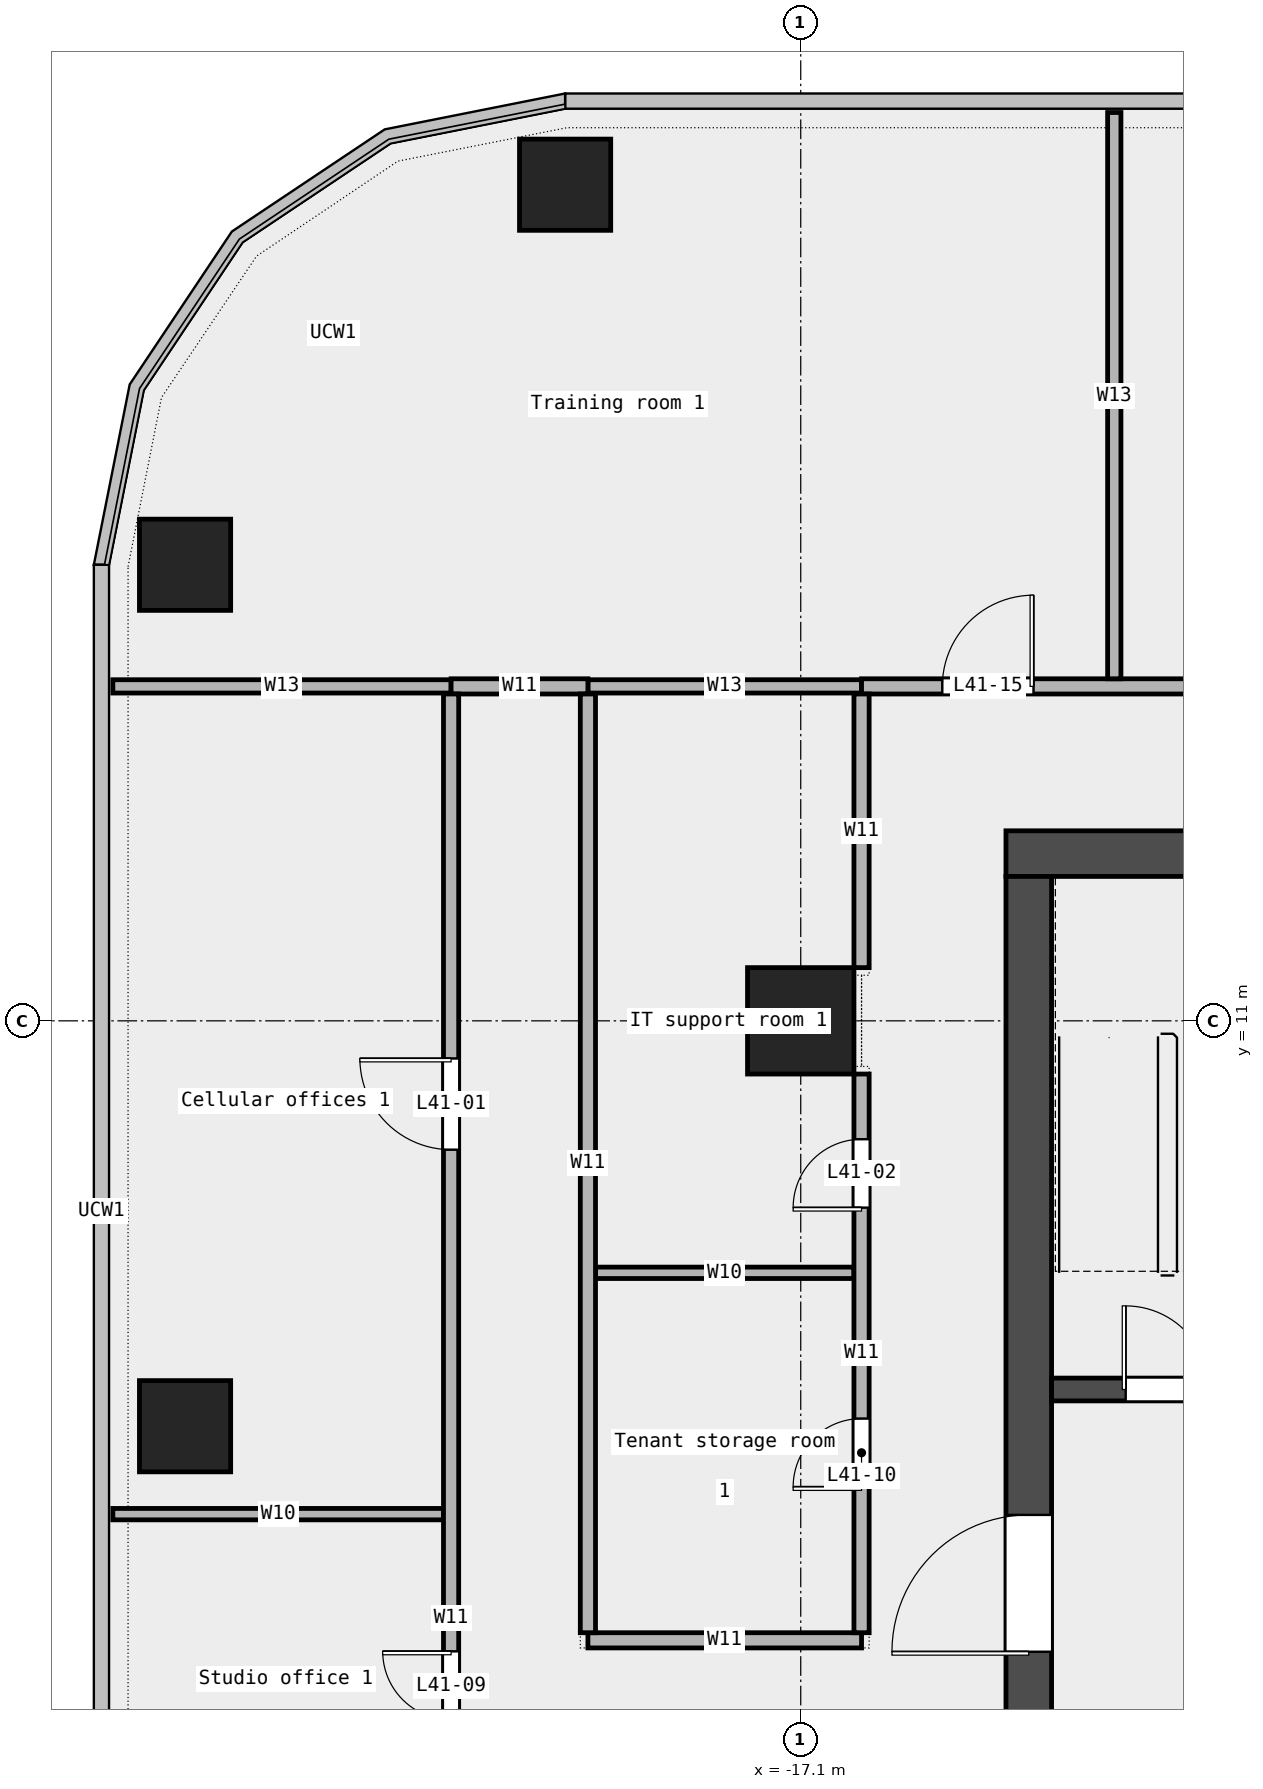
"""IFC4 building model, lengths in metres.
Left out: names, types, materials, properties, quantities, classifications, styles, units other than length and angle.
Written with IfcOpenShell. Run it as: python <this file> out.ifc"""

import sys

from ifc_helpers import new_model, si_unit, direction, frame, frame_2d, origin, origin_2d, place, context, subcontext, project, spatial, rectangle, extrude, element, fill, save


model = new_model("IFC4")
c1 = context("Model", 3, precision=1e-05, world=origin(), true_north=direction((0.0, 1.0)))
c2 = subcontext(c1, "Body", "Model", "MODEL_VIEW")
j1 = project(units=[si_unit("LENGTHUNIT", "METRE"), si_unit("PLANEANGLEUNIT", "RADIAN")], contexts=[c1])
p1 = place(None, origin())
s1 = spatial("IfcSite", under=j1, at=p1, CompositionType="ELEMENT")
p2 = place(p1, origin())
s2 = spatial("IfcBuilding", under=s1, at=p2, CompositionType="ELEMENT")
p3 = place(p2, frame((0.0, 0.0, 197.0)))
s3 = spatial("IfcBuildingStorey", under=s2, at=p3, CompositionType="ELEMENT", Elevation=197.0)
for number, where, z_axis, x_axis in (
    (1, (-20.2, 22.0, 0.0), (0.0, 0.0, 1.0), (1.0, 0.0, 0.0)),
    (2, (-25.2, 17.0, 0.0), (0.0, 0.0, 1.0), (1.0, 0.0, 0.0)),
    (3, (-25.2, 5.667, 0.0), (0.0, 0.0, 1.0), (1.0, 0.0, 0.0)),
):
    element("IfcColumn", number, at=place(p3, frame(where, z_axis=z_axis, x_axis=x_axis)), inside=s3, PredefinedType="COLUMN", context=c2, shape_type="SweptSolid", body=[
        extrude(rectangle(XDim=1.2, YDim=1.2, at=origin_2d()), origin(), (0.0, 0.0, 1.0), 3.6),
    ])
p4 = place(p3, frame((-17.1, 11.0, 0.0), z_axis=(0.0, 0.0, 1.0), x_axis=(1.0, 0.0, 0.0)))
e4 = element("IfcColumn", 4, at=p4, inside=s3, PredefinedType="COLUMN", context=c2, shape_type="SweptSolid", body=[
    extrude(rectangle(XDim=1.4, YDim=1.4, at=origin_2d()), origin(), (0.0, 0.0, 1.0), 3.6),
])
p5 = place(p3, frame((-19.9, 2.85, 0.0), z_axis=(0.0, 0.0, 1.0), x_axis=(1.0, 0.0, 0.0)))
e5 = element("IfcWall", 5, at=p5, inside=s3, PredefinedType="PARTITIONING", context=c2, shape_type="SweptSolid", body=[
    extrude(rectangle(XDim=3.6, YDim=0.2, at=frame_2d((1.8, 0.0))), origin(), (0.0, 0.0, 1.0), 3.6),
])
p6 = place(p3, frame((-26.15, 4.51, 0.0), z_axis=(0.0, 0.0, 1.0), x_axis=(1.0, 0.0, 0.0)))
e6 = element("IfcWall", 6, at=p6, inside=s3, PredefinedType="PARTITIONING", context=c2, shape_type="SweptSolid", body=[
    extrude(rectangle(XDim=4.35, YDim=0.15, at=frame_2d((2.175, 0.0))), origin(), (0.0, 0.0, 1.0), 3.6),
])
p7 = place(p3, frame((-19.8, 7.685, 0.0), z_axis=(0.0, 0.0, 1.0), x_axis=(1.0, 0.0, 0.0)))
e7 = element("IfcWall", 7, at=p7, inside=s3, PredefinedType="PARTITIONING", context=c2, shape_type="SweptSolid", body=[
    extrude(rectangle(XDim=3.4, YDim=0.15, at=frame_2d((1.7, 0.0))), origin(), (0.0, 0.0, 1.0), 3.6),
])
p8 = place(p3, frame((-26.15, 15.4, 0.0), z_axis=(0.0, 0.0, 1.0), x_axis=(1.0, 0.0, 0.0)))
e8 = element("IfcWall", 8, at=p8, inside=s3, PredefinedType="PARTITIONING", context=c2, shape_type="SweptSolid", body=[
    extrude(rectangle(XDim=4.45, YDim=0.175, at=frame_2d((2.225, 0.0))), origin(), (0.0, 0.0, 1.0), 3.6),
])
p9 = place(p3, frame((-19.9, 15.4, 0.0), z_axis=(0.0, 0.0, 1.0), x_axis=(1.0, 0.0, 0.0)))
e9 = element("IfcWall", 9, at=p9, inside=s3, PredefinedType="PARTITIONING", context=c2, shape_type="SweptSolid", body=[
    extrude(rectangle(XDim=3.6, YDim=0.175, at=frame_2d((1.8, 0.0))), origin(), (0.0, 0.0, 1.0), 3.6),
])
p10 = place(p3, frame((-21.7, 15.4, 0.0), z_axis=(0.0, 0.0, 1.0), x_axis=(1.0, 0.0, 0.0)))
e10 = element("IfcWall", 10, at=p10, inside=s3, PredefinedType="PARTITIONING", context=c2, shape_type="SweptSolid", body=[
    extrude(rectangle(XDim=1.8, YDim=0.2, at=frame_2d((0.9, 0.0))), origin(), (0.0, 0.0, 1.0), 3.6),
])
p11 = place(p3, frame((-16.3, 15.4, 0.0), z_axis=(0.0, 0.0, 1.0), x_axis=(1.0, 0.0, 0.0)))
e11 = element("IfcWall", 11, at=p11, inside=s3, PredefinedType="PARTITIONING", context=c2, shape_type="SweptSolid", body=[
    extrude(rectangle(XDim=32.6, YDim=0.2, at=frame_2d((16.3, 0.0))), origin(), (0.0, 0.0, 1.0), 3.6),
])
p12 = place(p11, frame((10.185, 0.0, 0.0)))
e12 = element("IfcOpeningElement", 12, at=p12, cuts=e11, PredefinedType="OPENING", context=c2, shape_type="SweptSolid", body=[
    extrude(rectangle(XDim=1.5, YDim=2.1, at=frame_2d((0.75, 1.05))), frame((0.0, 0.112, 0.0), z_axis=(0.0, -1.0, 0.0), x_axis=(1.0, 0.0, 0.0)), (0.0, 0.0, 1.0), 0.224),
])
p13 = place(p11, frame((1.062, 0.0, 0.0)))
e13 = element("IfcOpeningElement", 13, at=p13, cuts=e11, PredefinedType="OPENING", context=c2, shape_type="SweptSolid", body=[
    extrude(rectangle(XDim=1.2, YDim=2.1, at=frame_2d((0.6, 1.05))), frame((0.0, 0.112, 0.0), z_axis=(0.0, -1.0, 0.0), x_axis=(1.0, 0.0, 0.0)), (0.0, 0.0, 1.0), 0.224),
])
p14 = place(p11, frame((24.677, 0.0, 0.0)))
e14 = element("IfcOpeningElement", 14, at=p14, cuts=e11, PredefinedType="OPENING", context=c2, shape_type="SweptSolid", body=[
    extrude(rectangle(XDim=1.2, YDim=2.1, at=frame_2d((0.6, 1.05))), frame((0.0, 0.112, 0.0), z_axis=(0.0, -1.0, 0.0), x_axis=(1.0, 0.0, 0.0)), (0.0, 0.0, 1.0), 0.224),
])
p15 = place(p3, frame((-21.7, -9.0, 0.0), z_axis=(0.0, 0.0, 1.0), x_axis=(0.0, 1.0, 0.0)))
e15 = element("IfcWall", 15, at=p15, inside=s3, PredefinedType="PARTITIONING", context=c2, shape_type="SweptSolid", body=[
    extrude(rectangle(XDim=24.3, YDim=0.2, at=frame_2d((12.15, 0.0))), origin(), (0.0, 0.0, 1.0), 3.6),
])
p16 = place(p15, frame((18.305, 0.0, 0.0)))
e16 = element("IfcOpeningElement", 16, at=p16, cuts=e15, PredefinedType="OPENING", context=c2, shape_type="SweptSolid", body=[
    extrude(rectangle(XDim=1.2, YDim=2.1, at=frame_2d((0.6, 1.05))), frame((0.0, 0.112, 0.0), z_axis=(0.0, -1.0, 0.0), x_axis=(1.0, 0.0, 0.0)), (0.0, 0.0, 1.0), 0.224),
])
p17 = place(p15, frame((10.805, 0.0, 0.0)))
e17 = element("IfcOpeningElement", 17, at=p17, cuts=e15, PredefinedType="OPENING", context=c2, shape_type="SweptSolid", body=[
    extrude(rectangle(XDim=0.9, YDim=2.1, at=frame_2d((0.45, 1.05))), frame((0.0, 0.112, 0.0), z_axis=(0.0, -1.0, 0.0), x_axis=(1.0, 0.0, 0.0)), (0.0, 0.0, 1.0), 0.224),
])
p18 = place(p3, frame((-19.9, 2.95, 0.0), z_axis=(0.0, 0.0, 1.0), x_axis=(0.0, 1.0, 0.0)))
e18 = element("IfcWall", 18, at=p18, inside=s3, PredefinedType="PARTITIONING", context=c2, shape_type="SweptSolid", body=[
    extrude(rectangle(XDim=12.35, YDim=0.2, at=frame_2d((6.175, 0.0))), origin(), (0.0, 0.0, 1.0), 3.6),
])
p19 = place(p3, frame((-16.3, 2.95, 0.0), z_axis=(0.0, 0.0, 1.0), x_axis=(0.0, 1.0, 0.0)))
e19 = element("IfcWall", 19, at=p19, inside=s3, PredefinedType="PARTITIONING", context=c2, shape_type="SweptSolid", body=[
    extrude(rectangle(XDim=7.35, YDim=0.2, at=frame_2d((3.675, 0.0))), origin(), (0.0, 0.0, 1.0), 3.6),
])
p20 = place(p19, frame((5.593, 0.0, 0.0)))
e20 = element("IfcOpeningElement", 20, at=p20, cuts=e19, PredefinedType="OPENING", context=c2, shape_type="SweptSolid", body=[
    extrude(rectangle(XDim=0.9, YDim=2.1, at=frame_2d((0.45, 1.05))), frame((0.0, 0.112, 0.0), z_axis=(0.0, -1.0, 0.0), x_axis=(1.0, 0.0, 0.0)), (0.0, 0.0, 1.0), 0.224),
])
p21 = place(p19, frame((1.917, 0.0, 0.0)))
e21 = element("IfcOpeningElement", 21, at=p21, cuts=e19, PredefinedType="OPENING", context=c2, shape_type="SweptSolid", body=[
    extrude(rectangle(XDim=0.9, YDim=2.1, at=frame_2d((0.45, 1.05))), frame((0.0, 0.112, 0.0), z_axis=(0.0, -1.0, 0.0), x_axis=(1.0, 0.0, 0.0)), (0.0, 0.0, 1.0), 0.224),
])
p22 = place(p3, frame((-16.3, 11.7, 0.0), z_axis=(0.0, 0.0, 1.0), x_axis=(0.0, 1.0, 0.0)))
e22 = element("IfcWall", 22, at=p22, inside=s3, PredefinedType="PARTITIONING", context=c2, shape_type="SweptSolid", body=[
    extrude(rectangle(XDim=3.6, YDim=0.2, at=frame_2d((1.8, 0.0))), origin(), (0.0, 0.0, 1.0), 3.6),
])
p23 = place(p3, frame((-12.975, 15.5, 0.0), z_axis=(0.0, 0.0, 1.0), x_axis=(0.0, 1.0, 0.0)))
e23 = element("IfcWall", 23, at=p23, inside=s3, PredefinedType="PARTITIONING", context=c2, shape_type="SweptSolid", body=[
    extrude(rectangle(XDim=7.45, YDim=0.175, at=frame_2d((3.725, 0.0))), origin(), (0.0, 0.0, 1.0), 3.6),
])
p24 = place(p3, frame((-14.4, 13.2, 0.0), z_axis=(0.0, 0.0, 1.0), x_axis=(1.0, 0.0, 0.0)))
e24 = element("IfcWall", 24, at=p24, inside=s3, PredefinedType="SHEAR", context=c2, shape_type="SweptSolid", body=[
    extrude(rectangle(XDim=28.8, YDim=0.6, at=frame_2d((14.4, 0.0))), origin(), (0.0, 0.0, 1.0), 3.7),
])
p25 = place(p24, frame((6.775, 0.0, 0.0)))
e25 = element("IfcOpeningElement", 25, at=p25, cuts=e24, PredefinedType="OPENING", context=c2, shape_type="SweptSolid", body=[
    extrude(rectangle(XDim=1.0, YDim=2.1, at=frame_2d((0.5, 1.05))), frame((0.0, 0.312, 0.0), z_axis=(0.0, -1.0, 0.0), x_axis=(1.0, 0.0, 0.0)), (0.0, 0.0, 1.0), 0.624),
])
p26 = place(p24, frame((13.525, 0.0, 0.0)))
e26 = element("IfcOpeningElement", 26, at=p26, cuts=e24, PredefinedType="OPENING", context=c2, shape_type="SweptSolid", body=[
    extrude(rectangle(XDim=1.0, YDim=2.1, at=frame_2d((0.5, 1.05))), frame((0.0, 0.312, 0.0), z_axis=(0.0, -1.0, 0.0), x_axis=(1.0, 0.0, 0.0)), (0.0, 0.0, 1.0), 0.624),
])
p27 = place(p24, frame((20.65, 0.0, 0.0)))
e27 = element("IfcOpeningElement", 27, at=p27, cuts=e24, PredefinedType="OPENING", context=c2, shape_type="SweptSolid", body=[
    extrude(rectangle(XDim=1.0, YDim=2.1, at=frame_2d((0.5, 1.05))), frame((0.0, 0.312, 0.0), z_axis=(0.0, -1.0, 0.0), x_axis=(1.0, 0.0, 0.0)), (0.0, 0.0, 1.0), 0.624),
])
p28 = place(p3, frame((-14.1, -6.6, 0.0), z_axis=(0.0, 0.0, 1.0), x_axis=(0.0, 1.0, 0.0)))
e28 = element("IfcWall", 28, at=p28, inside=s3, PredefinedType="SHEAR", context=c2, shape_type="SweptSolid", body=[
    extrude(rectangle(XDim=19.5, YDim=0.6, at=frame_2d((9.75, 0.0))), origin(), (0.0, 0.0, 1.0), 3.7),
])
p29 = place(p28, frame((9.3, 0.0, 0.0)))
e29 = element("IfcOpeningElement", 29, at=p29, cuts=e28, PredefinedType="OPENING", context=c2, shape_type="SweptSolid", body=[
    extrude(rectangle(XDim=1.8, YDim=2.1, at=frame_2d((0.9, 1.05))), frame((0.0, 0.312, 0.0), z_axis=(0.0, -1.0, 0.0), x_axis=(1.0, 0.0, 0.0)), (0.0, 0.0, 1.0), 0.624),
])
p30 = place(p3, frame((-13.8, 6.15, 0.0), z_axis=(0.0, 0.0, 1.0), x_axis=(1.0, 0.0, 0.0)))
e30 = element("IfcWall", 30, at=p30, inside=s3, PredefinedType="SOLIDWALL", context=c2, shape_type="SweptSolid", body=[
    extrude(rectangle(XDim=3.15, YDim=0.3, at=frame_2d((1.575, 0.0))), origin(), (0.0, 0.0, 1.0), 3.7),
])
p31 = place(p30, frame((0.975, 0.0, 0.0)))
e31 = element("IfcOpeningElement", 31, at=p31, cuts=e30, PredefinedType="OPENING", context=c2, shape_type="SweptSolid", body=[
    extrude(rectangle(XDim=1.1, YDim=2.1, at=frame_2d((0.55, 1.05))), frame((0.0, 0.162, 0.0), z_axis=(0.0, -1.0, 0.0), x_axis=(1.0, 0.0, 0.0)), (0.0, 0.0, 1.0), 0.324),
])
p32 = place(p16, origin())
e32 = element("IfcDoor", 32, at=p32, inside=s3, OperationType="SINGLE_SWING_RIGHT", PredefinedType="DOOR", context=c2, shape_type="SweptSolid", body=[
    extrude(rectangle(XDim=1.2, YDim=2.1, at=frame_2d((0.6, 1.05))), frame((0.0, 0.025, 0.0), z_axis=(0.0, -1.0, 0.0), x_axis=(1.0, 0.0, 0.0)), (0.0, 0.0, 1.0), 0.05),
])
fill(e16, e32)
p33 = place(p20, origin())
e33 = element("IfcDoor", 33, at=p33, inside=s3, OperationType="SINGLE_SWING_LEFT", PredefinedType="DOOR", context=c2, shape_type="SweptSolid", body=[
    extrude(rectangle(XDim=0.9, YDim=2.1, at=frame_2d((0.45, 1.05))), frame((0.0, 0.025, 0.0), z_axis=(0.0, -1.0, 0.0), x_axis=(1.0, 0.0, 0.0)), (0.0, 0.0, 1.0), 0.05),
])
fill(e20, e33)
p34 = place(p17, origin())
e34 = element("IfcDoor", 34, at=p34, inside=s3, OperationType="SINGLE_SWING_RIGHT", PredefinedType="DOOR", context=c2, shape_type="SweptSolid", body=[
    extrude(rectangle(XDim=0.9, YDim=2.1, at=frame_2d((0.45, 1.05))), frame((0.0, 0.025, 0.0), z_axis=(0.0, -1.0, 0.0), x_axis=(1.0, 0.0, 0.0)), (0.0, 0.0, 1.0), 0.05),
])
fill(e17, e34)
p35 = place(p21, origin())
e35 = element("IfcDoor", 35, at=p35, inside=s3, OperationType="SINGLE_SWING_LEFT", PredefinedType="DOOR", context=c2, shape_type="SweptSolid", body=[
    extrude(rectangle(XDim=0.9, YDim=2.1, at=frame_2d((0.45, 1.05))), frame((0.0, 0.025, 0.0), z_axis=(0.0, -1.0, 0.0), x_axis=(1.0, 0.0, 0.0)), (0.0, 0.0, 1.0), 0.05),
])
fill(e21, e35)
p36 = place(p13, origin())
e36 = element("IfcDoor", 36, at=p36, inside=s3, OperationType="SINGLE_SWING_RIGHT", PredefinedType="DOOR", context=c2, shape_type="SweptSolid", body=[
    extrude(rectangle(XDim=1.2, YDim=2.1, at=frame_2d((0.6, 1.05))), frame((0.0, 0.025, 0.0), z_axis=(0.0, -1.0, 0.0), x_axis=(1.0, 0.0, 0.0)), (0.0, 0.0, 1.0), 0.05),
])
fill(e13, e36)
p37 = place(p31, origin())
e37 = element("IfcDoor", 37, at=p37, inside=s3, OperationType="SINGLE_SWING_LEFT", PredefinedType="DOOR", context=c2, shape_type="SweptSolid", body=[
    extrude(rectangle(XDim=1.1, YDim=2.1, at=frame_2d((0.55, 1.05))), frame((0.0, 0.025, 0.0), z_axis=(0.0, -1.0, 0.0), x_axis=(1.0, 0.0, 0.0)), (0.0, 0.0, 1.0), 0.05),
])
fill(e31, e37)
p38 = place(p29, origin())
e38 = element("IfcDoor", 38, at=p38, inside=s3, OperationType="DOUBLE_DOOR_SINGLE_SWING", PredefinedType="DOOR", context=c2, shape_type="SweptSolid", body=[
    extrude(rectangle(XDim=1.8, YDim=2.1, at=frame_2d((0.9, 1.05))), frame((0.0, 0.025, 0.0), z_axis=(0.0, -1.0, 0.0), x_axis=(1.0, 0.0, 0.0)), (0.0, 0.0, 1.0), 0.05),
])
fill(e29, e38)
save(model, sys.argv[1])
